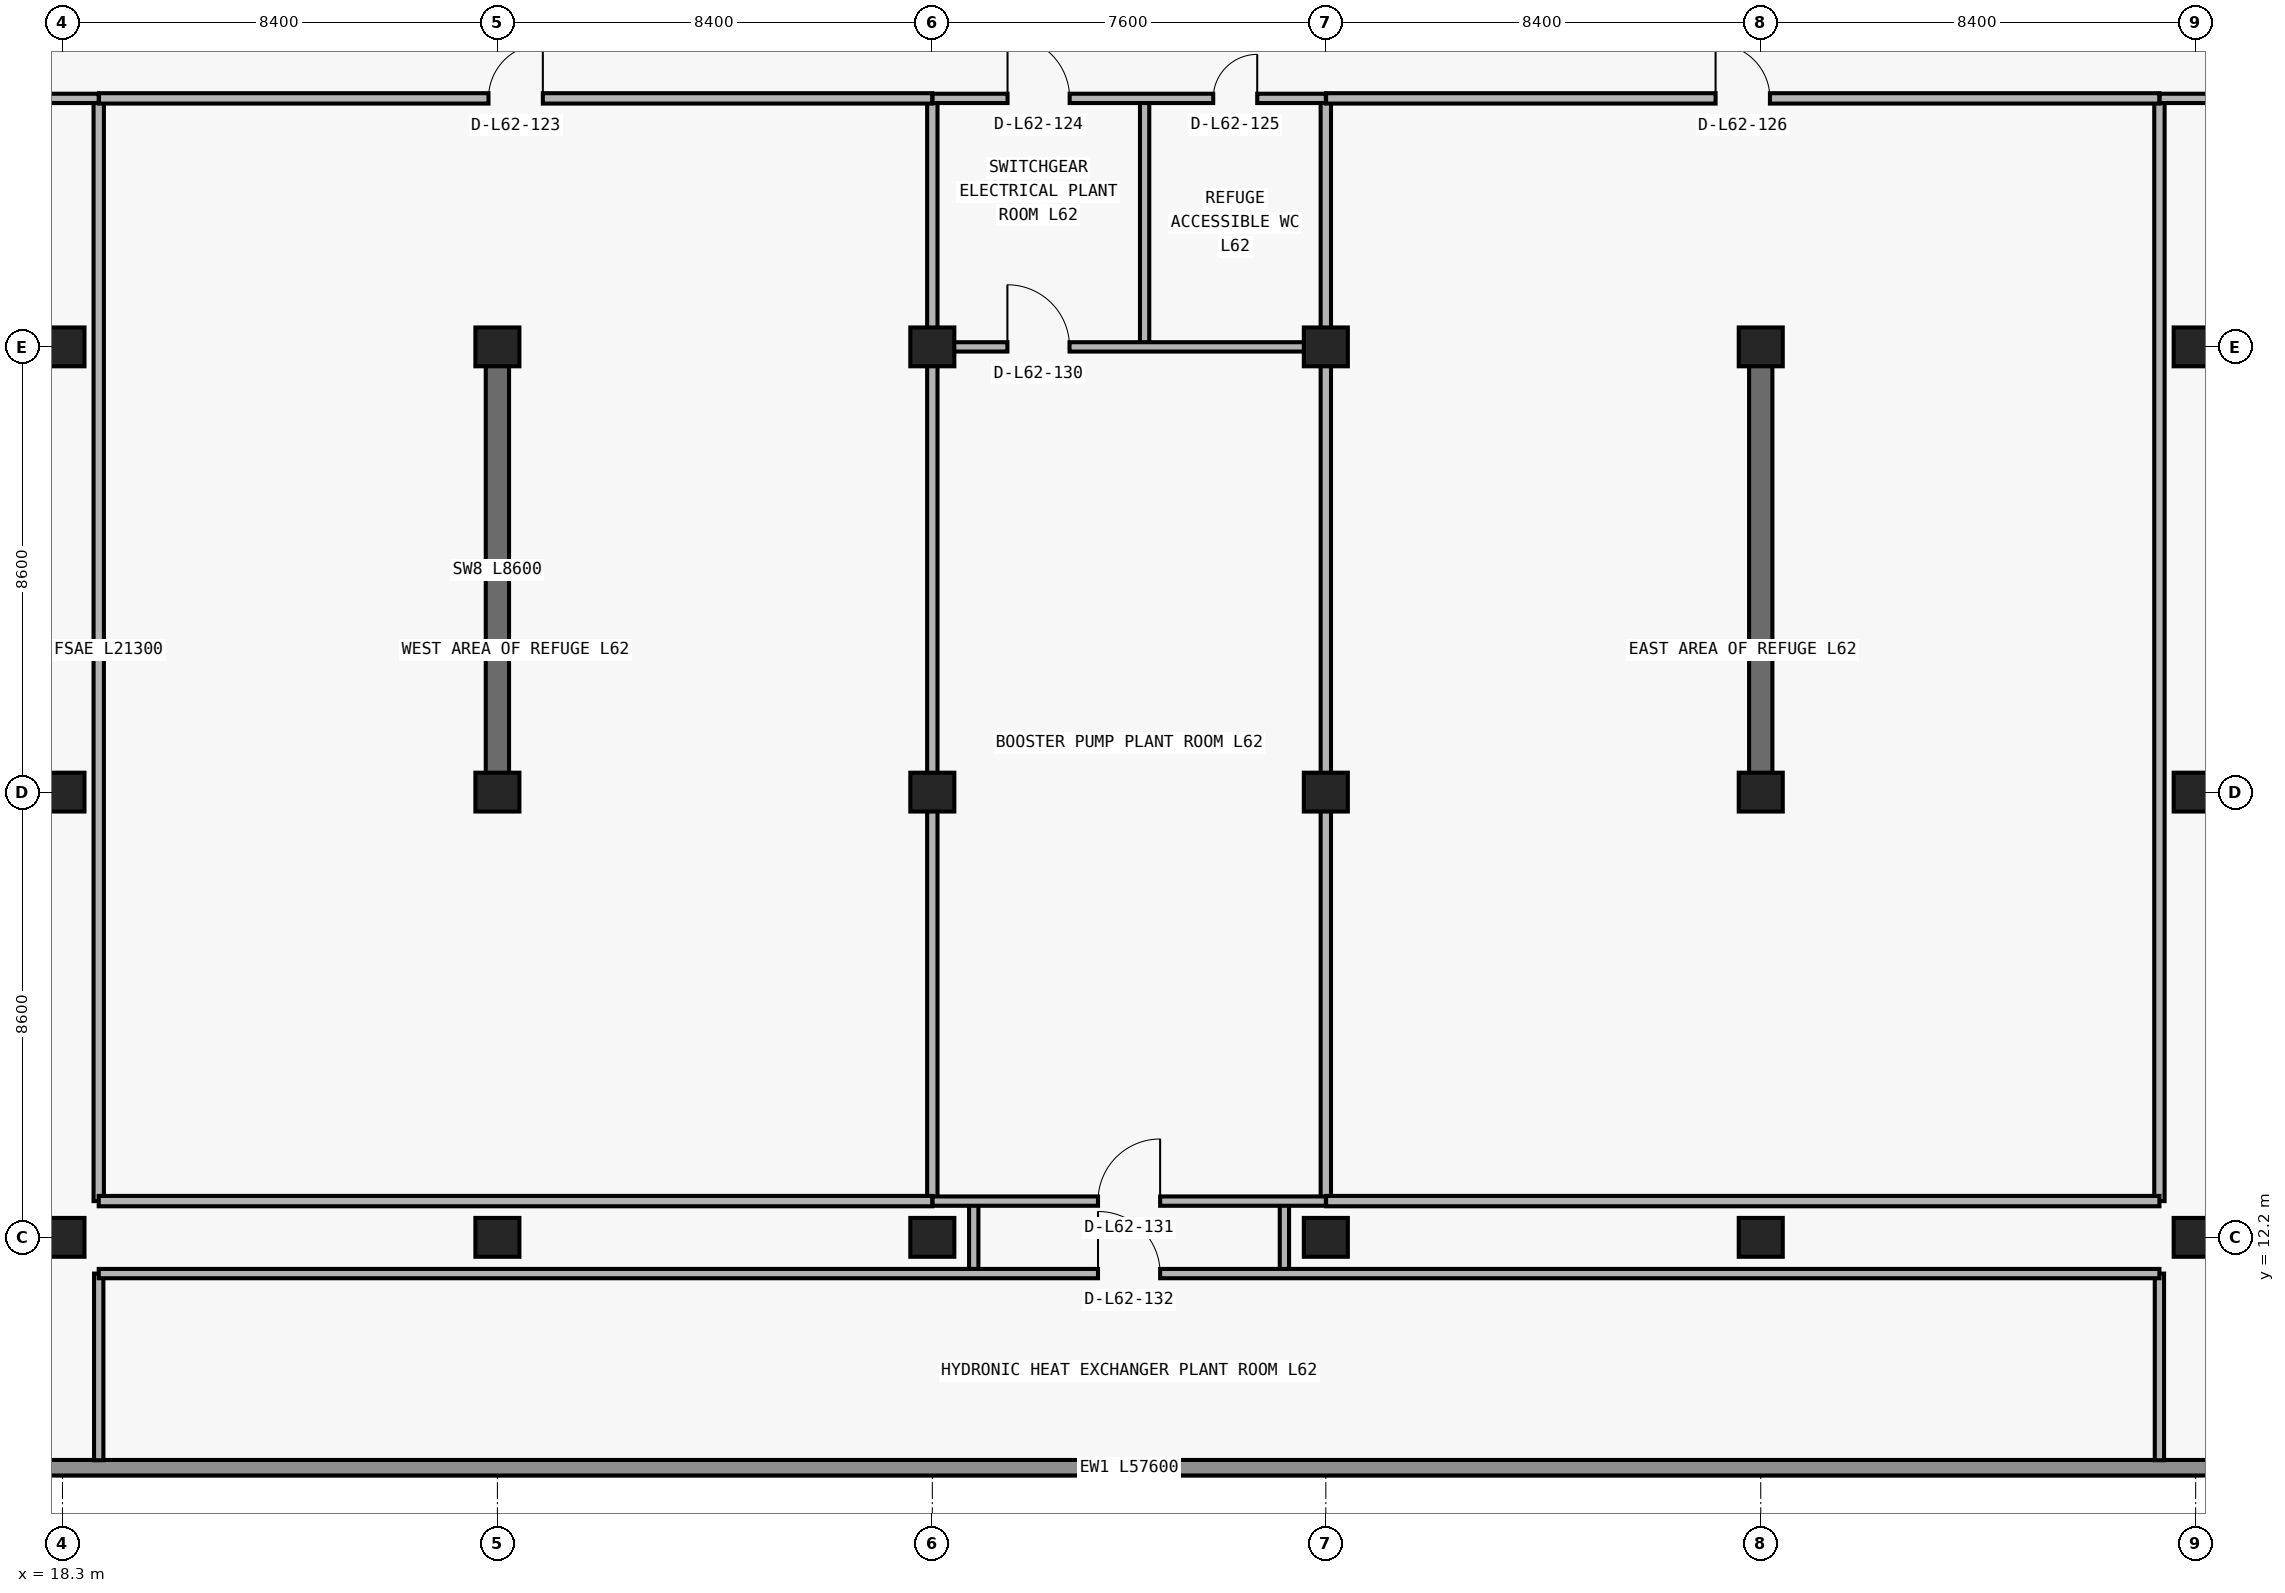
"""IFC4 building model, lengths in metres.
Left out: names, types, materials, properties, quantities, classifications, styles, units other than length and angle.
Written with IfcOpenShell. Run it as: python <this file> out.ifc"""

import sys

from ifc_helpers import new_model, si_unit, direction, frame, frame_2d, origin, origin_2d, place, context, subcontext, project, spatial, rectangle, extrude, element, fill, save


model = new_model("IFC4")
c1 = context("Model", 3, precision=1e-05, world=origin(), true_north=direction((0.0, 1.0)))
c2 = subcontext(c1, "Body", "Model", "MODEL_VIEW")
j1 = project(units=[si_unit("LENGTHUNIT", "METRE"), si_unit("PLANEANGLEUNIT", "RADIAN")], contexts=[c1])
p1 = place(None, origin())
s1 = spatial("IfcSite", under=j1, at=p1, CompositionType="ELEMENT")
p2 = place(p1, origin())
s2 = spatial("IfcBuilding", under=s1, at=p2, CompositionType="ELEMENT")
p3 = place(p2, frame((0.0, 0.0, 221.4)))
s3 = spatial("IfcBuildingStorey", under=s2, at=p3, CompositionType="ELEMENT", Elevation=221.4)
for number, where, z_axis, x_axis in (
    (1, (18.3, 12.2, 0.0), (0.0, 0.0, 1.0), (1.0, 0.0, 0.0)),
    (2, (26.7, 12.2, 0.0), (0.0, 0.0, 1.0), (1.0, 0.0, 0.0)),
    (3, (35.1, 12.2, 0.0), (0.0, 0.0, 1.0), (1.0, 0.0, 0.0)),
    (4, (42.7, 12.2, 0.0), (0.0, 0.0, 1.0), (1.0, 0.0, 0.0)),
    (5, (51.1, 12.2, 0.0), (0.0, 0.0, 1.0), (1.0, 0.0, 0.0)),
    (6, (59.5, 12.2, 0.0), (0.0, 0.0, 1.0), (1.0, 0.0, 0.0)),
    (7, (18.3, 20.8, 0.0), (0.0, 0.0, 1.0), (1.0, 0.0, 0.0)),
    (8, (26.7, 20.8, 0.0), (0.0, 0.0, 1.0), (1.0, 0.0, 0.0)),
    (9, (35.1, 20.8, 0.0), (0.0, 0.0, 1.0), (1.0, 0.0, 0.0)),
    (10, (42.7, 20.8, 0.0), (0.0, 0.0, 1.0), (1.0, 0.0, 0.0)),
    (11, (51.1, 20.8, 0.0), (0.0, 0.0, 1.0), (1.0, 0.0, 0.0)),
    (12, (59.5, 20.8, 0.0), (0.0, 0.0, 1.0), (1.0, 0.0, 0.0)),
    (13, (18.3, 29.4, 0.0), (0.0, 0.0, 1.0), (1.0, 0.0, 0.0)),
    (14, (26.7, 29.4, 0.0), (0.0, 0.0, 1.0), (1.0, 0.0, 0.0)),
    (15, (35.1, 29.4, 0.0), (0.0, 0.0, 1.0), (1.0, 0.0, 0.0)),
    (16, (42.7, 29.4, 0.0), (0.0, 0.0, 1.0), (1.0, 0.0, 0.0)),
    (17, (51.1, 29.4, 0.0), (0.0, 0.0, 1.0), (1.0, 0.0, 0.0)),
    (18, (59.5, 29.4, 0.0), (0.0, 0.0, 1.0), (1.0, 0.0, 0.0)),
):
    element("IfcColumn", number, at=place(p3, frame(where, z_axis=z_axis, x_axis=x_axis)), inside=s3, PredefinedType="COLUMN", context=c2, shape_type="SweptSolid", body=[
        extrude(rectangle(XDim=0.85, YDim=0.75, at=origin_2d()), origin(), (0.0, 0.0, 1.0), 4.85),
    ])
for number, where, z_axis, x_axis in (
    (19, (26.7, 20.8, 0.0), (0.0, 0.0, 1.0), (0.0, 1.0, 0.0)),
    (20, (51.1, 20.8, 0.0), (0.0, 0.0, 1.0), (0.0, 1.0, 0.0)),
):
    element("IfcWall", number, at=place(p3, frame(where, z_axis=z_axis, x_axis=x_axis)), inside=s3, PredefinedType="SHEAR", context=c2, shape_type="SweptSolid", body=[
        extrude(rectangle(XDim=8.6, YDim=0.45, at=frame_2d((4.3, 0.0))), origin(), (0.0, 0.0, 1.0), 4.85),
    ])
p4 = place(p3, frame((67.7, 7.75, 0.0), z_axis=(0.0, 0.0, 1.0), x_axis=(-1.0, 0.0, 0.0)))
e21 = element("IfcWall", 21, at=p4, inside=s3, PredefinedType="STANDARD", context=c2, shape_type="SweptSolid", body=[
    extrude(rectangle(XDim=57.6, YDim=0.3, at=frame_2d((28.8, 0.0))), origin(), (0.0, 0.0, 1.0), 4.85),
])
p5 = place(p3, frame((19.0, 7.895, 0.0), z_axis=(0.0, 0.0, 1.0), x_axis=(0.0, 1.0, 0.0)))
e22 = element("IfcWall", 22, at=p5, inside=s3, PredefinedType="PARTITIONING", context=c2, shape_type="SweptSolid", body=[
    extrude(rectangle(XDim=3.605, YDim=0.18, at=frame_2d((1.802, 0.0))), origin(), (0.0, 0.0, 1.0), 4.85),
])
p6 = place(p3, frame((19.0, 12.9, 0.0), z_axis=(0.0, 0.0, 1.0), x_axis=(0.0, 1.0, 0.0)))
e23 = element("IfcWall", 23, at=p6, inside=s3, PredefinedType="PARTITIONING", context=c2, shape_type="SweptSolid", body=[
    extrude(rectangle(XDim=21.3, YDim=0.2, at=frame_2d((10.65, 0.0))), origin(), (0.0, 0.0, 1.0), 4.85),
])
p7 = place(p3, frame((35.1, 12.9, 0.0), z_axis=(0.0, 0.0, 1.0), x_axis=(0.0, 1.0, 0.0)))
e24 = element("IfcWall", 24, at=p7, inside=s3, PredefinedType="PARTITIONING", context=c2, shape_type="SweptSolid", body=[
    extrude(rectangle(XDim=21.3, YDim=0.2, at=frame_2d((10.65, 0.0))), origin(), (0.0, 0.0, 1.0), 3.814),
])
p8 = place(p3, frame((35.9, 11.5, 0.0), z_axis=(0.0, 0.0, 1.0), x_axis=(0.0, 1.0, 0.0)))
e25 = element("IfcWall", 25, at=p8, inside=s3, PredefinedType="PARTITIONING", context=c2, shape_type="SweptSolid", body=[
    extrude(rectangle(XDim=1.4, YDim=0.18, at=frame_2d((0.7, 0.0))), origin(), (0.0, 0.0, 1.0), 4.85),
])
p9 = place(p3, frame((39.2, 29.4, 0.0), z_axis=(0.0, 0.0, 1.0), x_axis=(0.0, 1.0, 0.0)))
e26 = element("IfcWall", 26, at=p9, inside=s3, PredefinedType="PARTITIONING", context=c2, shape_type="SweptSolid", body=[
    extrude(rectangle(XDim=4.8, YDim=0.18, at=frame_2d((2.4, 0.0))), origin(), (0.0, 0.0, 1.0), 4.85),
])
p10 = place(p3, frame((41.9, 11.5, 0.0), z_axis=(0.0, 0.0, 1.0), x_axis=(0.0, 1.0, 0.0)))
e27 = element("IfcWall", 27, at=p10, inside=s3, PredefinedType="PARTITIONING", context=c2, shape_type="SweptSolid", body=[
    extrude(rectangle(XDim=1.4, YDim=0.18, at=frame_2d((0.7, 0.0))), origin(), (0.0, 0.0, 1.0), 4.85),
])
p11 = place(p3, frame((42.7, 12.9, 0.0), z_axis=(0.0, 0.0, 1.0), x_axis=(0.0, 1.0, 0.0)))
e28 = element("IfcWall", 28, at=p11, inside=s3, PredefinedType="PARTITIONING", context=c2, shape_type="SweptSolid", body=[
    extrude(rectangle(XDim=21.3, YDim=0.2, at=frame_2d((10.65, 0.0))), origin(), (0.0, 0.0, 1.0), 3.814),
])
p12 = place(p3, frame((58.8, 7.895, 0.0), z_axis=(0.0, 0.0, 1.0), x_axis=(0.0, 1.0, 0.0)))
e29 = element("IfcWall", 29, at=p12, inside=s3, PredefinedType="PARTITIONING", context=c2, shape_type="SweptSolid", body=[
    extrude(rectangle(XDim=3.605, YDim=0.18, at=frame_2d((1.802, 0.0))), origin(), (0.0, 0.0, 1.0), 4.85),
])
p13 = place(p3, frame((58.8, 12.9, 0.0), z_axis=(0.0, 0.0, 1.0), x_axis=(0.0, 1.0, 0.0)))
e30 = element("IfcWall", 30, at=p13, inside=s3, PredefinedType="PARTITIONING", context=c2, shape_type="SweptSolid", body=[
    extrude(rectangle(XDim=21.3, YDim=0.2, at=frame_2d((10.65, 0.0))), origin(), (0.0, 0.0, 1.0), 4.85),
])
p14 = place(p3, frame((19.0, 11.5, 0.0), z_axis=(0.0, 0.0, 1.0), x_axis=(1.0, 0.0, 0.0)))
e31 = element("IfcWall", 31, at=p14, inside=s3, PredefinedType="PARTITIONING", context=c2, shape_type="SweptSolid", body=[
    extrude(rectangle(XDim=39.8, YDim=0.18, at=frame_2d((19.9, 0.0))), origin(), (0.0, 0.0, 1.0), 4.85),
])
p15 = place(p14, frame((19.3, 0.0, 0.0)))
e32 = element("IfcOpeningElement", 32, at=p15, cuts=e31, PredefinedType="OPENING", context=c2, shape_type="SweptSolid", body=[
    extrude(rectangle(XDim=1.2, YDim=2.2, at=frame_2d((0.6, 1.1))), frame((0.0, 0.1, 0.0), z_axis=(0.0, -1.0, 0.0), x_axis=(1.0, 0.0, 0.0)), (0.0, 0.0, 1.0), 0.2),
])
p16 = place(p3, frame((19.0, 12.9, 0.0), z_axis=(0.0, 0.0, 1.0), x_axis=(1.0, 0.0, 0.0)))
e33 = element("IfcWall", 33, at=p16, inside=s3, PredefinedType="PARTITIONING", context=c2, shape_type="SweptSolid", body=[
    extrude(rectangle(XDim=16.1, YDim=0.2, at=frame_2d((8.05, 0.0))), origin(), (0.0, 0.0, 1.0), 4.85),
])
p17 = place(p3, frame((35.105, 12.9, 0.0), z_axis=(0.0, 0.0, 1.0), x_axis=(1.0, 0.0, 0.0)))
e34 = element("IfcWall", 34, at=p17, inside=s3, PredefinedType="PARTITIONING", context=c2, shape_type="SweptSolid", body=[
    extrude(rectangle(XDim=7.595, YDim=0.18, at=frame_2d((3.797, 0.0))), origin(), (0.0, 0.0, 1.0), 4.85),
])
p18 = place(p17, frame((3.195, 0.0, 0.0)))
e35 = element("IfcOpeningElement", 35, at=p18, cuts=e34, PredefinedType="OPENING", context=c2, shape_type="SweptSolid", body=[
    extrude(rectangle(XDim=1.2, YDim=2.2, at=frame_2d((0.6, 1.1))), frame((0.0, 0.1, 0.0), z_axis=(0.0, -1.0, 0.0), x_axis=(1.0, 0.0, 0.0)), (0.0, 0.0, 1.0), 0.2),
])
p19 = place(p3, frame((42.705, 12.9, 0.0), z_axis=(0.0, 0.0, 1.0), x_axis=(1.0, 0.0, 0.0)))
e36 = element("IfcWall", 36, at=p19, inside=s3, PredefinedType="PARTITIONING", context=c2, shape_type="SweptSolid", body=[
    extrude(rectangle(XDim=16.095, YDim=0.2, at=frame_2d((8.047, 0.0))), origin(), (0.0, 0.0, 1.0), 4.85),
])
p20 = place(p3, frame((35.1, 29.4, 0.0), z_axis=(0.0, 0.0, 1.0), x_axis=(1.0, 0.0, 0.0)))
e37 = element("IfcWall", 37, at=p20, inside=s3, PredefinedType="PARTITIONING", context=c2, shape_type="SweptSolid", body=[
    extrude(rectangle(XDim=7.6, YDim=0.18, at=frame_2d((3.8, 0.0))), origin(), (0.0, 0.0, 1.0), 3.814),
])
p21 = place(p20, frame((1.45, 0.0, 0.0)))
e38 = element("IfcOpeningElement", 38, at=p21, cuts=e37, PredefinedType="OPENING", context=c2, shape_type="SweptSolid", body=[
    extrude(rectangle(XDim=1.2, YDim=2.2, at=frame_2d((0.6, 1.1))), frame((0.0, 0.1, 0.0), z_axis=(0.0, -1.0, 0.0), x_axis=(1.0, 0.0, 0.0)), (0.0, 0.0, 1.0), 0.2),
])
p22 = place(p3, frame((10.1, 34.2, 0.0), z_axis=(0.0, 0.0, 1.0), x_axis=(1.0, 0.0, 0.0)))
e39 = element("IfcWall", 39, at=p22, inside=s3, PredefinedType="PARTITIONING", context=c2, shape_type="SweptSolid", body=[
    extrude(rectangle(XDim=8.9, YDim=0.18, at=frame_2d((4.45, 0.0))), origin(), (0.0, 0.0, 1.0), 4.85),
])
p23 = place(p22, frame((3.15, 0.0, 0.0)))
e40 = element("IfcOpeningElement", 40, at=p23, cuts=e39, PredefinedType="OPENING", context=c2, shape_type="SweptSolid", body=[
    extrude(rectangle(XDim=1.2, YDim=2.2, at=frame_2d((0.6, 1.1))), frame((0.0, 0.1, 0.0), z_axis=(0.0, -1.0, 0.0), x_axis=(1.0, 0.0, 0.0)), (0.0, 0.0, 1.0), 0.2),
])
p24 = place(p3, frame((19.005, 34.2, 0.0), z_axis=(0.0, 0.0, 1.0), x_axis=(1.0, 0.0, 0.0)))
e41 = element("IfcWall", 41, at=p24, inside=s3, PredefinedType="PARTITIONING", context=c2, shape_type="SweptSolid", body=[
    extrude(rectangle(XDim=16.095, YDim=0.2, at=frame_2d((8.048, 0.0))), origin(), (0.0, 0.0, 1.0), 4.85),
])
p25 = place(p24, frame((7.522, 0.0, 0.0)))
e42 = element("IfcOpeningElement", 42, at=p25, cuts=e41, PredefinedType="OPENING", context=c2, shape_type="SweptSolid", body=[
    extrude(rectangle(XDim=1.05, YDim=2.15, at=frame_2d((0.525, 1.075))), frame((0.0, 0.11, 0.0), z_axis=(0.0, -1.0, 0.0), x_axis=(1.0, 0.0, 0.0)), (0.0, 0.0, 1.0), 0.22),
])
p26 = place(p3, frame((35.105, 34.2, 0.0), z_axis=(0.0, 0.0, 1.0), x_axis=(1.0, 0.0, 0.0)))
e43 = element("IfcWall", 43, at=p26, inside=s3, PredefinedType="PARTITIONING", context=c2, shape_type="SweptSolid", body=[
    extrude(rectangle(XDim=7.595, YDim=0.18, at=frame_2d((3.797, 0.0))), origin(), (0.0, 0.0, 1.0), 4.85),
])
p27 = place(p26, frame((1.448, 0.0, 0.0)))
e44 = element("IfcOpeningElement", 44, at=p27, cuts=e43, PredefinedType="OPENING", context=c2, shape_type="SweptSolid", body=[
    extrude(rectangle(XDim=1.2, YDim=2.2, at=frame_2d((0.6, 1.1))), frame((0.0, 0.1, 0.0), z_axis=(0.0, -1.0, 0.0), x_axis=(1.0, 0.0, 0.0)), (0.0, 0.0, 1.0), 0.2),
])
p28 = place(p26, frame((5.42, 0.0, 0.0)))
e45 = element("IfcOpeningElement", 45, at=p28, cuts=e43, PredefinedType="OPENING", context=c2, shape_type="SweptSolid", body=[
    extrude(rectangle(XDim=0.85, YDim=2.1, at=frame_2d((0.425, 1.05))), frame((0.0, 0.1, 0.0), z_axis=(0.0, -1.0, 0.0), x_axis=(1.0, 0.0, 0.0)), (0.0, 0.0, 1.0), 0.2),
])
p29 = place(p3, frame((42.705, 34.2, 0.0), z_axis=(0.0, 0.0, 1.0), x_axis=(1.0, 0.0, 0.0)))
e46 = element("IfcWall", 46, at=p29, inside=s3, PredefinedType="PARTITIONING", context=c2, shape_type="SweptSolid", body=[
    extrude(rectangle(XDim=16.095, YDim=0.2, at=frame_2d((8.047, 0.0))), origin(), (0.0, 0.0, 1.0), 4.85),
])
p30 = place(p29, frame((7.522, 0.0, 0.0)))
e47 = element("IfcOpeningElement", 47, at=p30, cuts=e46, PredefinedType="OPENING", context=c2, shape_type="SweptSolid", body=[
    extrude(rectangle(XDim=1.05, YDim=2.15, at=frame_2d((0.525, 1.075))), frame((0.0, 0.11, 0.0), z_axis=(0.0, -1.0, 0.0), x_axis=(1.0, 0.0, 0.0)), (0.0, 0.0, 1.0), 0.22),
])
p31 = place(p3, frame((58.805, 34.2, 0.0), z_axis=(0.0, 0.0, 1.0), x_axis=(1.0, 0.0, 0.0)))
e48 = element("IfcWall", 48, at=p31, inside=s3, PredefinedType="PARTITIONING", context=c2, shape_type="SweptSolid", body=[
    extrude(rectangle(XDim=8.895, YDim=0.18, at=frame_2d((4.448, 0.0))), origin(), (0.0, 0.0, 1.0), 4.85),
])
p32 = place(p31, frame((4.545, 0.0, 0.0)))
e49 = element("IfcOpeningElement", 49, at=p32, cuts=e48, PredefinedType="OPENING", context=c2, shape_type="SweptSolid", body=[
    extrude(rectangle(XDim=1.2, YDim=2.2, at=frame_2d((0.6, 1.1))), frame((0.0, 0.1, 0.0), z_axis=(0.0, -1.0, 0.0), x_axis=(1.0, 0.0, 0.0)), (0.0, 0.0, 1.0), 0.2),
])
p33 = place(p25, origin())
e50 = element("IfcDoor", 50, at=p33, inside=s3, OperationType="SINGLE_SWING_RIGHT", PredefinedType="DOOR", context=c2, shape_type="SweptSolid", body=[
    extrude(rectangle(XDim=1.05, YDim=2.15, at=frame_2d((0.525, 1.075))), frame((0.0, 0.025, 0.0), z_axis=(0.0, -1.0, 0.0), x_axis=(1.0, 0.0, 0.0)), (0.0, 0.0, 1.0), 0.05),
])
fill(e42, e50)
p34 = place(p27, origin())
e51 = element("IfcDoor", 51, at=p34, inside=s3, OperationType="SINGLE_SWING_LEFT", PredefinedType="DOOR", context=c2, shape_type="SweptSolid", body=[
    extrude(rectangle(XDim=1.2, YDim=2.2, at=frame_2d((0.6, 1.1))), frame((0.0, 0.025, 0.0), z_axis=(0.0, -1.0, 0.0), x_axis=(1.0, 0.0, 0.0)), (0.0, 0.0, 1.0), 0.05),
])
fill(e44, e51)
p35 = place(p28, origin())
e52 = element("IfcDoor", 52, at=p35, inside=s3, OperationType="SINGLE_SWING_RIGHT", PredefinedType="DOOR", context=c2, shape_type="SweptSolid", body=[
    extrude(rectangle(XDim=0.85, YDim=2.1, at=frame_2d((0.425, 1.05))), frame((0.0, 0.025, 0.0), z_axis=(0.0, -1.0, 0.0), x_axis=(1.0, 0.0, 0.0)), (0.0, 0.0, 1.0), 0.05),
])
fill(e45, e52)
p36 = place(p30, origin())
e53 = element("IfcDoor", 53, at=p36, inside=s3, OperationType="SINGLE_SWING_LEFT", PredefinedType="DOOR", context=c2, shape_type="SweptSolid", body=[
    extrude(rectangle(XDim=1.05, YDim=2.15, at=frame_2d((0.525, 1.075))), frame((0.0, 0.025, 0.0), z_axis=(0.0, -1.0, 0.0), x_axis=(1.0, 0.0, 0.0)), (0.0, 0.0, 1.0), 0.05),
])
fill(e47, e53)
p37 = place(p21, origin())
e54 = element("IfcDoor", 54, at=p37, inside=s3, OperationType="SINGLE_SWING_LEFT", PredefinedType="DOOR", context=c2, shape_type="SweptSolid", body=[
    extrude(rectangle(XDim=1.2, YDim=2.2, at=frame_2d((0.6, 1.1))), frame((0.0, 0.025, 0.0), z_axis=(0.0, -1.0, 0.0), x_axis=(1.0, 0.0, 0.0)), (0.0, 0.0, 1.0), 0.05),
])
fill(e38, e54)
p38 = place(p18, origin())
e55 = element("IfcDoor", 55, at=p38, inside=s3, OperationType="SINGLE_SWING_RIGHT", PredefinedType="DOOR", context=c2, shape_type="SweptSolid", body=[
    extrude(rectangle(XDim=1.2, YDim=2.2, at=frame_2d((0.6, 1.1))), frame((0.0, 0.025, 0.0), z_axis=(0.0, -1.0, 0.0), x_axis=(1.0, 0.0, 0.0)), (0.0, 0.0, 1.0), 0.05),
])
fill(e35, e55)
p39 = place(p15, origin())
e56 = element("IfcDoor", 56, at=p39, inside=s3, OperationType="SINGLE_SWING_LEFT", PredefinedType="DOOR", context=c2, shape_type="SweptSolid", body=[
    extrude(rectangle(XDim=1.2, YDim=2.2, at=frame_2d((0.6, 1.1))), frame((0.0, 0.025, 0.0), z_axis=(0.0, -1.0, 0.0), x_axis=(1.0, 0.0, 0.0)), (0.0, 0.0, 1.0), 0.05),
])
fill(e32, e56)
save(model, sys.argv[1])
